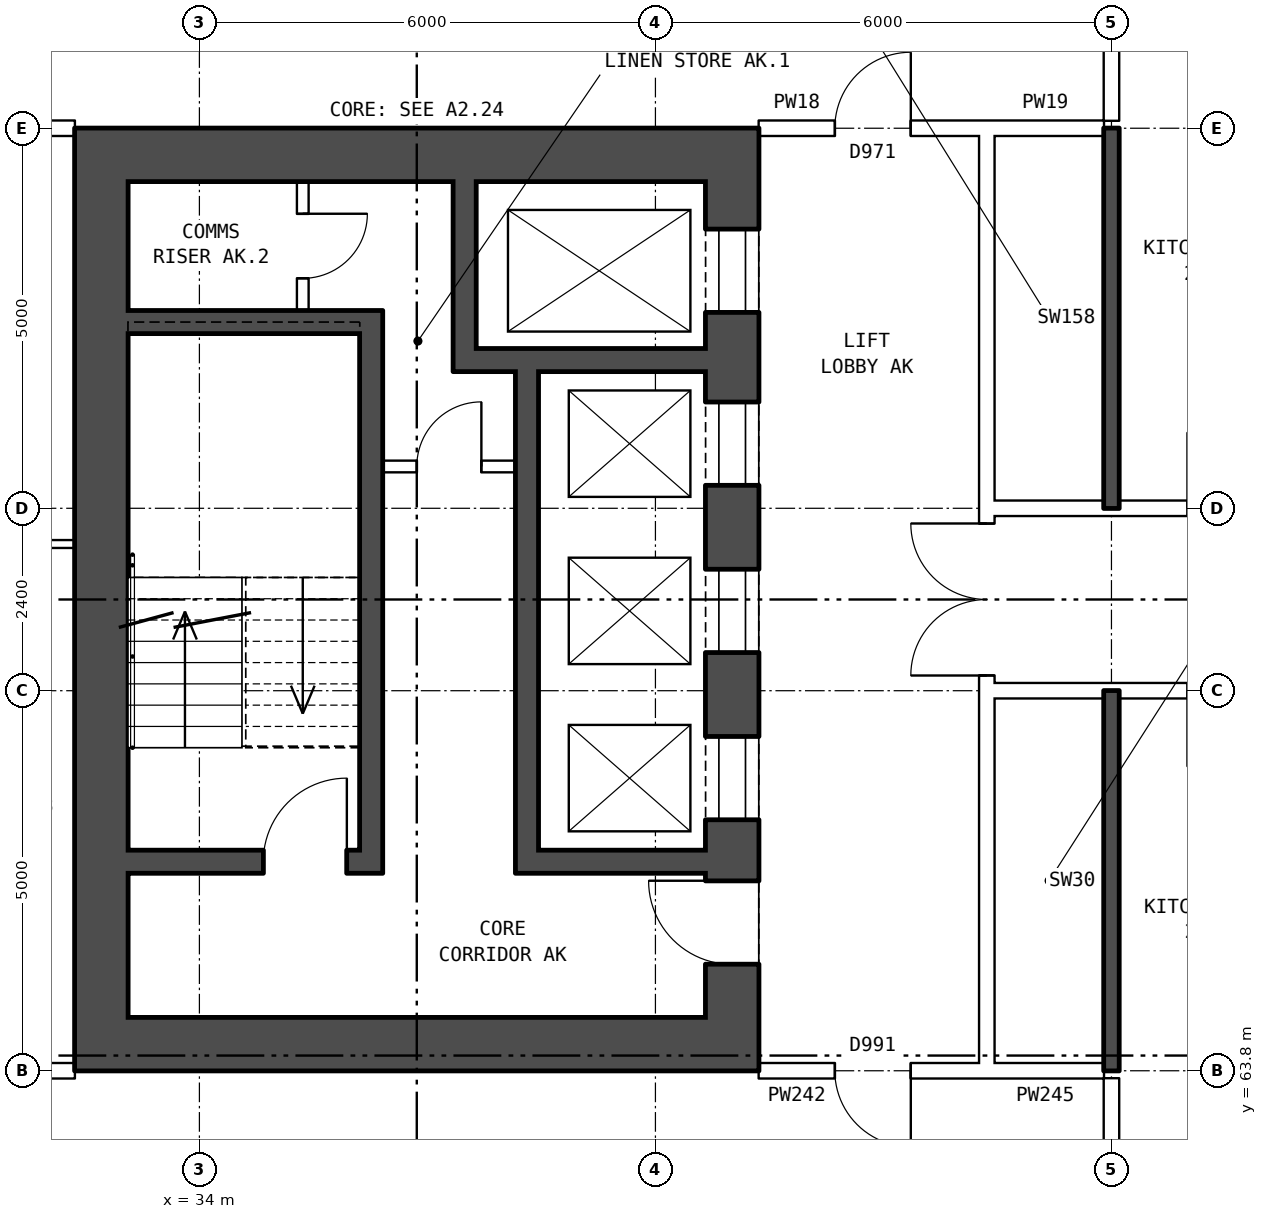
"""IFC4 building model, lengths in metres.
Left out: names, types, materials, properties, quantities, classifications, styles, units other than length and angle.
Written with IfcOpenShell. Run it as: python <this file> out.ifc"""

import sys

from ifc_helpers import new_model, si_unit, direction, frame, frame_2d, origin, place, context, subcontext, project, spatial, rectangle, extrude, element, fill, save


model = new_model("IFC4")
c1 = context("Model", 3, precision=1e-05, world=origin(), true_north=direction((0.0, 1.0)))
c2 = subcontext(c1, "Body", "Model", "MODEL_VIEW")
j1 = project(units=[si_unit("LENGTHUNIT", "METRE"), si_unit("PLANEANGLEUNIT", "RADIAN")], contexts=[c1])
p1 = place(None, origin())
s1 = spatial("IfcSite", under=j1, at=p1, CompositionType="ELEMENT")
p2 = place(p1, origin())
s2 = spatial("IfcBuilding", under=s1, at=p2, CompositionType="ELEMENT")
p3 = place(p2, frame((0.0, 0.0, 84.0)))
s3 = spatial("IfcBuildingStorey", under=s2, at=p3, CompositionType="ELEMENT", Elevation=84.0)
p4 = place(p3, frame((41.01, 75.5, 0.0), z_axis=(0.0, 0.0, 1.0), x_axis=(0.0, -1.0, 0.0)))
e1 = element("IfcWall", 1, at=p4, inside=s3, PredefinedType="SHEAR", context=c2, shape_type="SweptSolid", body=[
    extrude(rectangle(XDim=11.0, YDim=0.7, at=frame_2d((5.5, 0.0))), origin(), (0.0, 0.0, 1.0), 2.85),
])
p5 = place(p4, frame((0.625, 0.0, 0.0)))
e2 = element("IfcOpeningElement", 2, at=p5, cuts=e1, PredefinedType="OPENING", context=c2, shape_type="SweptSolid", body=[
    extrude(rectangle(XDim=1.1, YDim=2.1, at=frame_2d((0.55, 1.05))), frame((0.0, 0.36, 0.0), z_axis=(0.0, -1.0, 0.0), x_axis=(1.0, 0.0, 0.0)), (0.0, 0.0, 1.0), 0.72),
])
p6 = place(p4, frame((2.9, 0.0, 0.0)))
e3 = element("IfcOpeningElement", 3, at=p6, cuts=e1, PredefinedType="OPENING", context=c2, shape_type="SweptSolid", body=[
    extrude(rectangle(XDim=1.1, YDim=2.1, at=frame_2d((0.55, 1.05))), frame((0.0, 0.36, 0.0), z_axis=(0.0, -1.0, 0.0), x_axis=(1.0, 0.0, 0.0)), (0.0, 0.0, 1.0), 0.72),
])
p7 = place(p4, frame((5.1, 0.0, 0.0)))
e4 = element("IfcOpeningElement", 4, at=p7, cuts=e1, PredefinedType="OPENING", context=c2, shape_type="SweptSolid", body=[
    extrude(rectangle(XDim=1.1, YDim=2.1, at=frame_2d((0.55, 1.05))), frame((0.0, 0.36, 0.0), z_axis=(0.0, -1.0, 0.0), x_axis=(1.0, 0.0, 0.0)), (0.0, 0.0, 1.0), 0.72),
])
p8 = place(p4, frame((7.3, 0.0, 0.0)))
e5 = element("IfcOpeningElement", 5, at=p8, cuts=e1, PredefinedType="OPENING", context=c2, shape_type="SweptSolid", body=[
    extrude(rectangle(XDim=1.1, YDim=2.1, at=frame_2d((0.55, 1.05))), frame((0.0, 0.36, 0.0), z_axis=(0.0, -1.0, 0.0), x_axis=(1.0, 0.0, 0.0)), (0.0, 0.0, 1.0), 0.72),
])
p9 = place(p4, frame((9.2, 0.0, 0.0)))
e6 = element("IfcOpeningElement", 6, at=p9, cuts=e1, PredefinedType="OPENING", context=c2, shape_type="SweptSolid", body=[
    extrude(rectangle(XDim=1.1, YDim=2.1, at=frame_2d((0.55, 1.05))), frame((0.0, 0.36, 0.0), z_axis=(0.0, -1.0, 0.0), x_axis=(1.0, 0.0, 0.0)), (0.0, 0.0, 1.0), 0.72),
])
p10 = place(p3, frame((32.71, 75.5, 0.0), z_axis=(0.0, 0.0, 1.0), x_axis=(0.0, -1.0, 0.0)))
e7 = element("IfcWall", 7, at=p10, inside=s3, PredefinedType="SHEAR", context=c2, shape_type="SweptSolid", body=[
    extrude(rectangle(XDim=11.0, YDim=0.7, at=frame_2d((5.5, 0.0))), origin(), (0.0, 0.0, 1.0), 2.85),
])
for number, where, z_axis, x_axis in (
    (8, (41.36, 75.85, 0.0), (0.0, 0.0, 1.0), (-1.0, 0.0, 0.0)),
    (9, (41.36, 64.15, 0.0), (0.0, 0.0, 1.0), (-1.0, 0.0, 0.0)),
):
    element("IfcWall", number, at=place(p3, frame(where, z_axis=z_axis, x_axis=x_axis)), inside=s3, PredefinedType="SHEAR", context=c2, shape_type="SweptSolid", body=[
        extrude(rectangle(XDim=9.0, YDim=0.7, at=frame_2d((4.5, 0.0))), origin(), (0.0, 0.0, 1.0), 2.85),
    ])
p11 = place(p3, frame((36.11, 73.65, 0.0), z_axis=(0.0, 0.0, 1.0), x_axis=(-1.0, 0.0, 0.0)))
e10 = element("IfcWall", 10, at=p11, inside=s3, PredefinedType="SHEAR", context=c2, shape_type="SweptSolid", body=[
    extrude(rectangle(XDim=3.05, YDim=0.3, at=frame_2d((1.525, 0.0))), origin(), (0.0, 0.0, 1.0), 2.85),
])
p12 = place(p3, frame((40.66, 73.15, 0.0), z_axis=(0.0, 0.0, 1.0), x_axis=(-1.0, 0.0, 0.0)))
e11 = element("IfcWall", 11, at=p12, inside=s3, PredefinedType="SHEAR", context=c2, shape_type="SweptSolid", body=[
    extrude(rectangle(XDim=3.32, YDim=0.3, at=frame_2d((1.66, 0.0))), origin(), (0.0, 0.0, 1.0), 2.85),
])
p13 = place(p3, frame((38.16, 71.75, 0.0), z_axis=(0.0, 0.0, 1.0), x_axis=(-1.0, 0.0, 0.0)))
e12 = element("IfcWall", 12, at=p13, inside=s3, PredefinedType="PARTITIONING", context=c2, shape_type="SweptSolid", body=[
    extrude(rectangle(XDim=1.75, YDim=0.15, at=frame_2d((0.875, 0.0))), origin(), (0.0, 0.0, 1.0), 2.85),
])
p14 = place(p13, frame((0.45, 0.0, 0.0)))
e13 = element("IfcOpeningElement", 13, at=p14, cuts=e12, PredefinedType="OPENING", context=c2, shape_type="SweptSolid", body=[
    extrude(rectangle(XDim=0.85, YDim=2.1, at=frame_2d((0.425, 1.05))), frame((0.0, 0.085, 0.0), z_axis=(0.0, -1.0, 0.0), x_axis=(1.0, 0.0, 0.0)), (0.0, 0.0, 1.0), 0.17),
])
p15 = place(p3, frame((40.66, 66.55, 0.0), z_axis=(0.0, 0.0, 1.0), x_axis=(-1.0, 0.0, 0.0)))
e14 = element("IfcWall", 14, at=p15, inside=s3, PredefinedType="SHEAR", context=c2, shape_type="SweptSolid", body=[
    extrude(rectangle(XDim=2.2, YDim=0.3, at=frame_2d((1.1, 0.0))), origin(), (0.0, 0.0, 1.0), 2.85),
])
p16 = place(p3, frame((36.11, 66.55, 0.0), z_axis=(0.0, 0.0, 1.0), x_axis=(-1.0, 0.0, 0.0)))
e15 = element("IfcWall", 15, at=p16, inside=s3, PredefinedType="SHEAR", context=c2, shape_type="SweptSolid", body=[
    extrude(rectangle(XDim=3.05, YDim=0.3, at=frame_2d((1.525, 0.0))), origin(), (0.0, 0.0, 1.0), 2.85),
])
p17 = place(p16, frame((0.17, 0.0, 0.0)))
e16 = element("IfcOpeningElement", 16, at=p17, cuts=e15, PredefinedType="OPENING", context=c2, shape_type="SweptSolid", body=[
    extrude(rectangle(XDim=1.1, YDim=2.1, at=frame_2d((0.55, 1.05))), frame((0.0, 0.16, 0.0), z_axis=(0.0, -1.0, 0.0), x_axis=(1.0, 0.0, 0.0)), (0.0, 0.0, 1.0), 0.32),
])
p18 = place(p3, frame((38.31, 73.0, 0.0), z_axis=(0.0, 0.0, 1.0), x_axis=(0.0, -1.0, 0.0)))
e17 = element("IfcWall", 17, at=p18, inside=s3, PredefinedType="SHEAR", context=c2, shape_type="SweptSolid", body=[
    extrude(rectangle(XDim=6.6, YDim=0.3, at=frame_2d((3.3, 0.0))), origin(), (0.0, 0.0, 1.0), 2.85),
])
p19 = place(p3, frame((37.49, 75.5, 0.0), z_axis=(0.0, 0.0, 1.0), x_axis=(0.0, -1.0, 0.0)))
e18 = element("IfcWall", 18, at=p19, inside=s3, PredefinedType="SHEAR", context=c2, shape_type="SweptSolid", body=[
    extrude(rectangle(XDim=2.2, YDim=0.3, at=frame_2d((1.1, 0.0))), origin(), (0.0, 0.0, 1.0), 2.85),
])
p20 = place(p3, frame((36.26, 73.8, 0.0), z_axis=(0.0, 0.0, 1.0), x_axis=(0.0, -1.0, 0.0)))
e19 = element("IfcWall", 19, at=p20, inside=s3, PredefinedType="SHEAR", context=c2, shape_type="SweptSolid", body=[
    extrude(rectangle(XDim=7.4, YDim=0.3, at=frame_2d((3.7, 0.0))), origin(), (0.0, 0.0, 1.0), 2.85),
])
p21 = place(p3, frame((35.36, 75.5, 0.0), z_axis=(0.0, 0.0, 1.0), x_axis=(0.0, -1.0, 0.0)))
e20 = element("IfcWall", 20, at=p21, inside=s3, PredefinedType="PARTITIONING", context=c2, shape_type="SweptSolid", body=[
    extrude(rectangle(XDim=1.7, YDim=0.15, at=frame_2d((0.85, 0.0))), origin(), (0.0, 0.0, 1.0), 2.85),
])
p22 = place(p21, frame((0.425, 0.0, 0.0)))
e21 = element("IfcOpeningElement", 21, at=p22, cuts=e20, PredefinedType="OPENING", context=c2, shape_type="SweptSolid", body=[
    extrude(rectangle(XDim=0.85, YDim=2.1, at=frame_2d((0.425, 1.05))), frame((0.0, 0.085, 0.0), z_axis=(0.0, -1.0, 0.0), x_axis=(1.0, 0.0, 0.0)), (0.0, 0.0, 1.0), 0.17),
])
p23 = place(p3, frame((44.36, 63.9, 0.0), z_axis=(0.0, 0.0, 1.0), x_axis=(0.0, 1.0, 0.0)))
e22 = element("IfcWall", 22, at=p23, inside=s3, PredefinedType="PARTITIONING", context=c2, shape_type="SweptSolid", body=[
    extrude(rectangle(XDim=12.2, YDim=0.2, at=frame_2d((6.1, 0.0))), origin(), (0.0, 0.0, 1.0), 2.85),
])
p24 = place(p23, frame((5.1, 0.0, 0.0)))
e23 = element("IfcOpeningElement", 23, at=p24, cuts=e22, PredefinedType="OPENING", context=c2, shape_type="SweptSolid", body=[
    extrude(rectangle(XDim=2.0, YDim=2.1, at=frame_2d((1.0, 1.05))), frame((0.0, 0.11, 0.0), z_axis=(0.0, -1.0, 0.0), x_axis=(1.0, 0.0, 0.0)), (0.0, 0.0, 1.0), 0.22),
])
p25 = place(p3, frame((26.01, 63.8, 0.0), z_axis=(0.0, 0.0, 1.0), x_axis=(1.0, 0.0, 0.0)))
e24 = element("IfcWall", 24, at=p25, inside=s3, PredefinedType="PARTITIONING", context=c2, shape_type="SweptSolid", body=[
    extrude(rectangle(XDim=6.35, YDim=0.2, at=frame_2d((3.175, 0.0))), origin(), (0.0, 0.0, 1.0), 2.85),
])
p26 = place(p25, frame((3.77, 0.0, 0.0)))
e25 = element("IfcOpeningElement", 25, at=p26, cuts=e24, PredefinedType="OPENING", context=c2, shape_type="SweptSolid", body=[
    extrude(rectangle(XDim=0.8, YDim=2.1, at=frame_2d((0.4, 1.05))), frame((0.0, 0.11, 0.0), z_axis=(0.0, -1.0, 0.0), x_axis=(1.0, 0.0, 0.0)), (0.0, 0.0, 1.0), 0.22),
])
p27 = place(p3, frame((41.36, 63.8, 0.0), z_axis=(0.0, 0.0, 1.0), x_axis=(1.0, 0.0, 0.0)))
e26 = element("IfcWall", 26, at=p27, inside=s3, PredefinedType="PARTITIONING", context=c2, shape_type="SweptSolid", body=[
    extrude(rectangle(XDim=3.0, YDim=0.2, at=frame_2d((1.5, 0.0))), origin(), (0.0, 0.0, 1.0), 2.85),
])
p28 = place(p27, frame((1.0, 0.0, 0.0)))
e27 = element("IfcOpeningElement", 27, at=p28, cuts=e26, PredefinedType="OPENING", context=c2, shape_type="SweptSolid", body=[
    extrude(rectangle(XDim=1.0, YDim=2.1, at=frame_2d((0.5, 1.05))), frame((0.0, 0.11, 0.0), z_axis=(0.0, -1.0, 0.0), x_axis=(1.0, 0.0, 0.0)), (0.0, 0.0, 1.0), 0.22),
])
p29 = place(p3, frame((44.36, 63.8, 0.0), z_axis=(0.0, 0.0, 1.0), x_axis=(1.0, 0.0, 0.0)))
e28 = element("IfcWall", 28, at=p29, inside=s3, PredefinedType="PARTITIONING", context=c2, shape_type="SweptSolid", body=[
    extrude(rectangle(XDim=1.54, YDim=0.2, at=frame_2d((0.77, 0.0))), origin(), (0.0, 0.0, 1.0), 2.85),
])
p30 = place(p3, frame((44.36, 68.8, 0.0), z_axis=(0.0, 0.0, 1.0), x_axis=(1.0, 0.0, 0.0)))
e29 = element("IfcWall", 29, at=p30, inside=s3, PredefinedType="PARTITIONING", context=c2, shape_type="SweptSolid", body=[
    extrude(rectangle(XDim=19.28, YDim=0.2, at=frame_2d((9.64, 0.0))), origin(), (0.0, 0.0, 1.0), 2.85),
])
p31 = place(p30, frame((14.64, 0.0, 0.0)))
e30 = element("IfcOpeningElement", 30, at=p31, cuts=e29, PredefinedType="OPENING", context=c2, shape_type="SweptSolid", body=[
    extrude(rectangle(XDim=1.0, YDim=2.1, at=frame_2d((0.5, 1.05))), frame((0.0, 0.11, 0.0), z_axis=(0.0, -1.0, 0.0), x_axis=(1.0, 0.0, 0.0)), (0.0, 0.0, 1.0), 0.22),
])
p32 = place(p30, frame((11.64, 0.0, 0.0)))
e31 = element("IfcOpeningElement", 31, at=p32, cuts=e29, PredefinedType="OPENING", context=c2, shape_type="SweptSolid", body=[
    extrude(rectangle(XDim=1.0, YDim=2.1, at=frame_2d((0.5, 1.05))), frame((0.0, 0.11, 0.0), z_axis=(0.0, -1.0, 0.0), x_axis=(1.0, 0.0, 0.0)), (0.0, 0.0, 1.0), 0.22),
])
p33 = place(p30, frame((2.64, 0.0, 0.0)))
e32 = element("IfcOpeningElement", 32, at=p33, cuts=e29, PredefinedType="OPENING", context=c2, shape_type="SweptSolid", body=[
    extrude(rectangle(XDim=1.0, YDim=2.1, at=frame_2d((0.5, 1.05))), frame((0.0, 0.11, 0.0), z_axis=(0.0, -1.0, 0.0), x_axis=(1.0, 0.0, 0.0)), (0.0, 0.0, 1.0), 0.22),
])
p34 = place(p3, frame((28.1, 70.73, 0.0), z_axis=(0.0, 0.0, 1.0), x_axis=(1.0, 0.0, 0.0)))
e33 = element("IfcWall", 33, at=p34, inside=s3, PredefinedType="PARTITIONING", context=c2, shape_type="SweptSolid", body=[
    extrude(rectangle(XDim=4.26, YDim=0.1, at=frame_2d((2.13, 0.0))), origin(), (0.0, 0.0, 1.0), 2.85),
])
p35 = place(p3, frame((44.36, 71.2, 0.0), z_axis=(0.0, 0.0, 1.0), x_axis=(1.0, 0.0, 0.0)))
e34 = element("IfcWall", 34, at=p35, inside=s3, PredefinedType="PARTITIONING", context=c2, shape_type="SweptSolid", body=[
    extrude(rectangle(XDim=19.28, YDim=0.2, at=frame_2d((9.64, 0.0))), origin(), (0.0, 0.0, 1.0), 2.85),
])
p36 = place(p35, frame((14.64, 0.0, 0.0)))
e35 = element("IfcOpeningElement", 35, at=p36, cuts=e34, PredefinedType="OPENING", context=c2, shape_type="SweptSolid", body=[
    extrude(rectangle(XDim=1.0, YDim=2.1, at=frame_2d((0.5, 1.05))), frame((0.0, 0.11, 0.0), z_axis=(0.0, -1.0, 0.0), x_axis=(1.0, 0.0, 0.0)), (0.0, 0.0, 1.0), 0.22),
])
p37 = place(p35, frame((8.64, 0.0, 0.0)))
e36 = element("IfcOpeningElement", 36, at=p37, cuts=e34, PredefinedType="OPENING", context=c2, shape_type="SweptSolid", body=[
    extrude(rectangle(XDim=1.0, YDim=2.1, at=frame_2d((0.5, 1.05))), frame((0.0, 0.11, 0.0), z_axis=(0.0, -1.0, 0.0), x_axis=(1.0, 0.0, 0.0)), (0.0, 0.0, 1.0), 0.22),
])
p38 = place(p35, frame((2.64, 0.0, 0.0)))
e37 = element("IfcOpeningElement", 37, at=p38, cuts=e34, PredefinedType="OPENING", context=c2, shape_type="SweptSolid", body=[
    extrude(rectangle(XDim=1.0, YDim=2.1, at=frame_2d((0.5, 1.05))), frame((0.0, 0.11, 0.0), z_axis=(0.0, -1.0, 0.0), x_axis=(1.0, 0.0, 0.0)), (0.0, 0.0, 1.0), 0.22),
])
p39 = place(p3, frame((26.01, 76.2, 0.0), z_axis=(0.0, 0.0, 1.0), x_axis=(1.0, 0.0, 0.0)))
e38 = element("IfcWall", 38, at=p39, inside=s3, PredefinedType="PARTITIONING", context=c2, shape_type="SweptSolid", body=[
    extrude(rectangle(XDim=6.35, YDim=0.2, at=frame_2d((3.175, 0.0))), origin(), (0.0, 0.0, 1.0), 2.85),
])
p40 = place(p39, frame((3.77, 0.0, 0.0)))
e39 = element("IfcOpeningElement", 39, at=p40, cuts=e38, PredefinedType="OPENING", context=c2, shape_type="SweptSolid", body=[
    extrude(rectangle(XDim=0.8, YDim=2.1, at=frame_2d((0.4, 1.05))), frame((0.0, 0.11, 0.0), z_axis=(0.0, -1.0, 0.0), x_axis=(1.0, 0.0, 0.0)), (0.0, 0.0, 1.0), 0.22),
])
p41 = place(p3, frame((41.36, 76.2, 0.0), z_axis=(0.0, 0.0, 1.0), x_axis=(1.0, 0.0, 0.0)))
e40 = element("IfcWall", 40, at=p41, inside=s3, PredefinedType="PARTITIONING", context=c2, shape_type="SweptSolid", body=[
    extrude(rectangle(XDim=3.0, YDim=0.2, at=frame_2d((1.5, 0.0))), origin(), (0.0, 0.0, 1.0), 2.85),
])
p42 = place(p41, frame((1.0, 0.0, 0.0)))
e41 = element("IfcOpeningElement", 41, at=p42, cuts=e40, PredefinedType="OPENING", context=c2, shape_type="SweptSolid", body=[
    extrude(rectangle(XDim=1.0, YDim=2.1, at=frame_2d((0.5, 1.05))), frame((0.0, 0.11, 0.0), z_axis=(0.0, -1.0, 0.0), x_axis=(1.0, 0.0, 0.0)), (0.0, 0.0, 1.0), 0.22),
])
p43 = place(p3, frame((44.36, 76.2, 0.0), z_axis=(0.0, 0.0, 1.0), x_axis=(1.0, 0.0, 0.0)))
e42 = element("IfcWall", 42, at=p43, inside=s3, PredefinedType="PARTITIONING", context=c2, shape_type="SweptSolid", body=[
    extrude(rectangle(XDim=1.54, YDim=0.2, at=frame_2d((0.77, 0.0))), origin(), (0.0, 0.0, 1.0), 2.85),
])
p44 = place(p3, frame((46.0, 61.5, 0.0), z_axis=(0.0, 0.0, 1.0), x_axis=(0.0, 1.0, 0.0)))
e43 = element("IfcWall", 43, at=p44, inside=s3, PredefinedType="PARTITIONING", context=c2, shape_type="SweptSolid", body=[
    extrude(rectangle(XDim=2.2, YDim=0.2, at=frame_2d((1.1, 0.0))), origin(), (0.0, 0.0, 1.0), 2.85),
])
for number, where, z_axis, x_axis in (
    (44, (46.0, 63.8, 0.0), (0.0, 0.0, 1.0), (0.0, 1.0, 0.0)),
    (45, (46.0, 71.2, 0.0), (0.0, 0.0, 1.0), (0.0, 1.0, 0.0)),
):
    element("IfcWall", number, at=place(p3, frame(where, z_axis=z_axis, x_axis=x_axis)), inside=s3, PredefinedType="SOLIDWALL", context=c2, shape_type="SweptSolid", body=[
        extrude(rectangle(XDim=5.0, YDim=0.2, at=frame_2d((2.5, 0.0))), origin(), (0.0, 0.0, 1.0), 2.85),
    ])
p45 = place(p3, frame((46.0, 76.3, 0.0), z_axis=(0.0, 0.0, 1.0), x_axis=(0.0, 1.0, 0.0)))
e46 = element("IfcWall", 46, at=p45, inside=s3, PredefinedType="PARTITIONING", context=c2, shape_type="SweptSolid", body=[
    extrude(rectangle(XDim=2.2, YDim=0.2, at=frame_2d((1.1, 0.0))), origin(), (0.0, 0.0, 1.0), 2.85),
])
p46 = place(p5, origin())
e47 = element("IfcDoor", 47, at=p46, inside=s3, OperationType="DOUBLE_DOOR_SLIDING", PredefinedType="DOOR", context=c2, shape_type="SweptSolid", body=[
    extrude(rectangle(XDim=1.1, YDim=2.1, at=frame_2d((0.55, 1.05))), frame((0.0, -0.285, 0.0), z_axis=(0.0, -1.0, 0.0), x_axis=(1.0, 0.0, 0.0)), (0.0, 0.0, 1.0), 0.05),
])
fill(e2, e47)
p47 = place(p6, origin())
e48 = element("IfcDoor", 48, at=p47, inside=s3, OperationType="DOUBLE_DOOR_SLIDING", PredefinedType="DOOR", context=c2, shape_type="SweptSolid", body=[
    extrude(rectangle(XDim=1.1, YDim=2.1, at=frame_2d((0.55, 1.05))), frame((0.0, -0.285, 0.0), z_axis=(0.0, -1.0, 0.0), x_axis=(1.0, 0.0, 0.0)), (0.0, 0.0, 1.0), 0.05),
])
fill(e3, e48)
p48 = place(p7, origin())
e49 = element("IfcDoor", 49, at=p48, inside=s3, OperationType="DOUBLE_DOOR_SLIDING", PredefinedType="DOOR", context=c2, shape_type="SweptSolid", body=[
    extrude(rectangle(XDim=1.1, YDim=2.1, at=frame_2d((0.55, 1.05))), frame((0.0, -0.285, 0.0), z_axis=(0.0, -1.0, 0.0), x_axis=(1.0, 0.0, 0.0)), (0.0, 0.0, 1.0), 0.05),
])
fill(e4, e49)
p49 = place(p8, origin())
e50 = element("IfcDoor", 50, at=p49, inside=s3, OperationType="DOUBLE_DOOR_SLIDING", PredefinedType="DOOR", context=c2, shape_type="SweptSolid", body=[
    extrude(rectangle(XDim=1.1, YDim=2.1, at=frame_2d((0.55, 1.05))), frame((0.0, -0.285, 0.0), z_axis=(0.0, -1.0, 0.0), x_axis=(1.0, 0.0, 0.0)), (0.0, 0.0, 1.0), 0.05),
])
fill(e5, e50)
p50 = place(p9, frame((1.1, 0.0, 0.0), z_axis=(0.0, 0.0, 1.0), x_axis=(-1.0, 0.0, 0.0)))
e51 = element("IfcDoor", 51, at=p50, inside=s3, OperationType="SINGLE_SWING_RIGHT", PredefinedType="DOOR", context=c2, shape_type="SweptSolid", body=[
    extrude(rectangle(XDim=1.1, YDim=2.1, at=frame_2d((0.55, 1.05))), frame((0.0, 0.335, 0.0), z_axis=(0.0, -1.0, 0.0), x_axis=(1.0, 0.0, 0.0)), (0.0, 0.0, 1.0), 0.05),
])
fill(e6, e51)
p51 = place(p17, frame((1.1, 0.0, 0.0), z_axis=(0.0, 0.0, 1.0), x_axis=(-1.0, 0.0, 0.0)))
e52 = element("IfcDoor", 52, at=p51, inside=s3, OperationType="SINGLE_SWING_RIGHT", PredefinedType="DOOR", context=c2, shape_type="SweptSolid", body=[
    extrude(rectangle(XDim=1.1, YDim=2.1, at=frame_2d((0.55, 1.05))), frame((0.0, 0.025, 0.0), z_axis=(0.0, -1.0, 0.0), x_axis=(1.0, 0.0, 0.0)), (0.0, 0.0, 1.0), 0.05),
])
fill(e16, e52)
p52 = place(p14, frame((0.85, 0.0, 0.0), z_axis=(0.0, 0.0, 1.0), x_axis=(-1.0, 0.0, 0.0)))
e53 = element("IfcDoor", 53, at=p52, inside=s3, OperationType="SINGLE_SWING_RIGHT", PredefinedType="DOOR", context=c2, shape_type="SweptSolid", body=[
    extrude(rectangle(XDim=0.85, YDim=2.1, at=frame_2d((0.425, 1.05))), frame((0.0, 0.025, 0.0), z_axis=(0.0, -1.0, 0.0), x_axis=(1.0, 0.0, 0.0)), (0.0, 0.0, 1.0), 0.05),
])
fill(e13, e53)
p53 = place(p22, origin())
e54 = element("IfcDoor", 54, at=p53, inside=s3, OperationType="SINGLE_SWING_LEFT", PredefinedType="DOOR", context=c2, shape_type="SweptSolid", body=[
    extrude(rectangle(XDim=0.85, YDim=2.1, at=frame_2d((0.425, 1.05))), frame((0.0, 0.025, 0.0), z_axis=(0.0, -1.0, 0.0), x_axis=(1.0, 0.0, 0.0)), (0.0, 0.0, 1.0), 0.05),
])
fill(e21, e54)
p54 = place(p24, origin())
e55 = element("IfcDoor", 55, at=p54, inside=s3, OperationType="DOUBLE_DOOR_SINGLE_SWING", PredefinedType="DOOR", context=c2, shape_type="SweptSolid", body=[
    extrude(rectangle(XDim=2.0, YDim=2.1, at=frame_2d((1.0, 1.05))), frame((0.0, 0.025, 0.0), z_axis=(0.0, -1.0, 0.0), x_axis=(1.0, 0.0, 0.0)), (0.0, 0.0, 1.0), 0.05),
])
fill(e23, e55)
p55 = place(p28, frame((1.0, 0.0, 0.0), z_axis=(0.0, 0.0, 1.0), x_axis=(-1.0, 0.0, 0.0)))
e56 = element("IfcDoor", 56, at=p55, inside=s3, OperationType="SINGLE_SWING_LEFT", PredefinedType="DOOR", context=c2, shape_type="SweptSolid", body=[
    extrude(rectangle(XDim=1.0, YDim=2.1, at=frame_2d((0.5, 1.05))), frame((0.0, 0.025, 0.0), z_axis=(0.0, -1.0, 0.0), x_axis=(1.0, 0.0, 0.0)), (0.0, 0.0, 1.0), 0.05),
])
fill(e27, e56)
p56 = place(p42, origin())
e57 = element("IfcDoor", 57, at=p56, inside=s3, OperationType="SINGLE_SWING_RIGHT", PredefinedType="DOOR", context=c2, shape_type="SweptSolid", body=[
    extrude(rectangle(XDim=1.0, YDim=2.1, at=frame_2d((0.5, 1.05))), frame((0.0, 0.025, 0.0), z_axis=(0.0, -1.0, 0.0), x_axis=(1.0, 0.0, 0.0)), (0.0, 0.0, 1.0), 0.05),
])
fill(e41, e57)
save(model, sys.argv[1])
